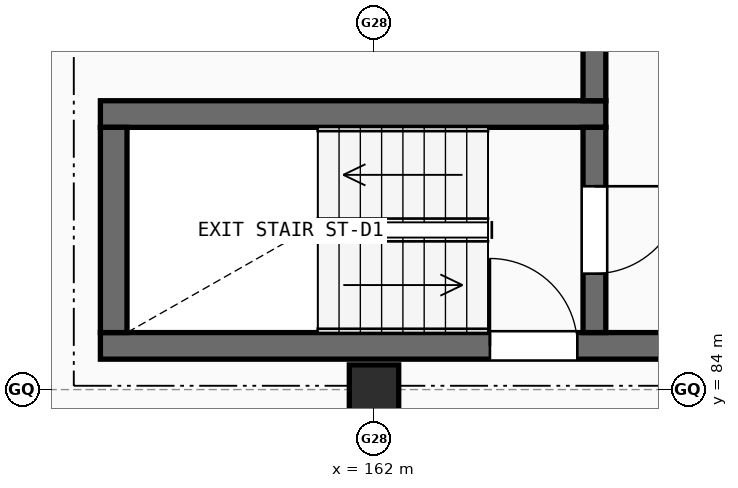
"""IFC4 building model, lengths in metres.
Left out: names, types, materials, properties, quantities, classifications, styles, units other than length and angle.
Written with IfcOpenShell. Run it as: python <this file> out.ifc"""

import sys

from ifc_helpers import new_model, si_unit, direction, frame, frame_2d, origin, origin_2d, place, context, subcontext, project, spatial, rectangle, extrude, element, fill, save


model = new_model("IFC4")
c1 = context("Model", 3, precision=1e-05, world=origin(), true_north=direction((0.0, 1.0)))
c2 = subcontext(c1, "Body", "Model", "MODEL_VIEW")
j1 = project(units=[si_unit("LENGTHUNIT", "METRE"), si_unit("PLANEANGLEUNIT", "RADIAN")], contexts=[c1])
p1 = place(None, origin())
s1 = spatial("IfcSite", under=j1, at=p1, CompositionType="ELEMENT")
p2 = place(p1, origin())
s2 = spatial("IfcBuilding", under=s1, at=p2, CompositionType="ELEMENT")
p3 = place(p2, frame((0.0, 0.0, 10.9)))
s3 = spatial("IfcBuildingStorey", under=s2, at=p3, CompositionType="ELEMENT", Elevation=10.9)
p4 = place(p3, frame((162.0, 84.0, 0.0), z_axis=(0.0, 0.0, 1.0), x_axis=(1.0, 0.0, 0.0)))
e1 = element("IfcColumn", 1, at=p4, inside=s3, PredefinedType="COLUMN", context=c2, shape_type="SweptSolid", body=[
    extrude(rectangle(XDim=0.65, YDim=0.65, at=origin_2d()), origin(), (0.0, 0.0, 1.0), 2.96),
])
p5 = place(p3, frame((158.4, 84.575, 0.0), z_axis=(0.0, 0.0, 1.0), x_axis=(1.0, 0.0, 0.0)))
e2 = element("IfcWall", 2, at=p5, inside=s3, PredefinedType="SHEAR", context=c2, shape_type="SweptSolid", body=[
    extrude(rectangle(XDim=11.4, YDim=0.35, at=frame_2d((5.7, 0.0))), origin(), (0.0, 0.0, 1.0), 2.96),
])
p6 = place(p5, frame((5.125, 0.0, 0.0)))
e3 = element("IfcOpeningElement", 3, at=p6, cuts=e2, PredefinedType="OPENING", context=c2, shape_type="SweptSolid", body=[
    extrude(rectangle(XDim=1.15, YDim=2.15, at=frame_2d((0.575, 1.075))), frame((0.0, 0.185, 0.0), z_axis=(0.0, -1.0, 0.0), x_axis=(1.0, 0.0, 0.0)), (0.0, 0.0, 1.0), 0.37),
])
p7 = place(p3, frame((165.05, 87.625, 0.0), z_axis=(0.0, 0.0, 1.0), x_axis=(-1.0, 0.0, 0.0)))
e4 = element("IfcWall", 4, at=p7, inside=s3, PredefinedType="SHEAR", context=c2, shape_type="SweptSolid", body=[
    extrude(rectangle(XDim=6.65, YDim=0.35, at=frame_2d((3.325, 0.0))), origin(), (0.0, 0.0, 1.0), 2.96),
])
p8 = place(p3, frame((158.575, 87.45, 0.0), z_axis=(0.0, 0.0, 1.0), x_axis=(0.0, -1.0, 0.0)))
e5 = element("IfcWall", 5, at=p8, inside=s3, PredefinedType="SHEAR", context=c2, shape_type="SweptSolid", body=[
    extrude(rectangle(XDim=2.7, YDim=0.35, at=frame_2d((1.35, 0.0))), origin(), (0.0, 0.0, 1.0), 2.96),
])
p9 = place(p3, frame((164.9, 84.75, 0.0), z_axis=(0.0, 0.0, 1.0), x_axis=(0.0, 1.0, 0.0)))
e6 = element("IfcWall", 6, at=p9, inside=s3, PredefinedType="SHEAR", context=c2, shape_type="SweptSolid", body=[
    extrude(rectangle(XDim=2.7, YDim=0.3, at=frame_2d((1.35, 0.0))), origin(), (0.0, 0.0, 1.0), 2.96),
])
p10 = place(p9, frame((0.775, 0.0, 0.0)))
e7 = element("IfcOpeningElement", 7, at=p10, cuts=e6, PredefinedType="OPENING", context=c2, shape_type="SweptSolid", body=[
    extrude(rectangle(XDim=1.15, YDim=2.15, at=frame_2d((0.575, 1.075))), frame((0.0, 0.16, 0.0), z_axis=(0.0, -1.0, 0.0), x_axis=(1.0, 0.0, 0.0)), (0.0, 0.0, 1.0), 0.32),
])
p11 = place(p3, frame((164.9, 87.8, 0.0), z_axis=(0.0, 0.0, 1.0), x_axis=(0.0, 1.0, 0.0)))
e8 = element("IfcWall", 8, at=p11, inside=s3, PredefinedType="SHEAR", context=c2, shape_type="SweptSolid", body=[
    extrude(rectangle(XDim=3.35, YDim=0.3, at=frame_2d((1.675, 0.0))), origin(), (0.0, 0.0, 1.0), 2.96),
])
p12 = place(p6, origin())
e9 = element("IfcDoor", 9, at=p12, inside=s3, OperationType="SINGLE_SWING_LEFT", PredefinedType="DOOR", context=c2, shape_type="SweptSolid", body=[
    extrude(rectangle(XDim=1.15, YDim=2.15, at=frame_2d((0.575, 1.075))), frame((0.0, 0.025, 0.0), z_axis=(0.0, -1.0, 0.0), x_axis=(1.0, 0.0, 0.0)), (0.0, 0.0, 1.0), 0.05),
])
fill(e3, e9)
p13 = place(p10, origin())
e10 = element("IfcDoor", 10, at=p13, inside=s3, OperationType="SINGLE_SWING_RIGHT", PredefinedType="DOOR", context=c2, shape_type="SweptSolid", body=[
    extrude(rectangle(XDim=1.15, YDim=2.15, at=frame_2d((0.575, 1.075))), frame((0.0, 0.025, 0.0), z_axis=(0.0, -1.0, 0.0), x_axis=(1.0, 0.0, 0.0)), (0.0, 0.0, 1.0), 0.05),
])
fill(e7, e10)
save(model, sys.argv[1])
